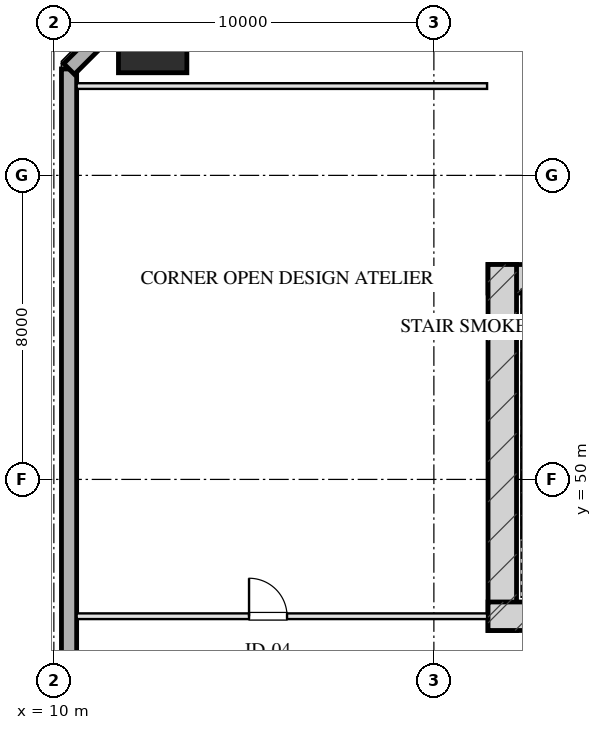
"""IFC4 building model, lengths in metres.
Left out: names, types, materials, properties, quantities, classifications, styles, units other than length and angle.
Written with IfcOpenShell. Run it as: python <this file> out.ifc"""

import sys

from ifc_helpers import new_model, si_unit, direction, frame, frame_2d, origin, origin_2d, place, context, subcontext, project, spatial, rectangle, hollow_rectangle, extrude, element, fill, save


model = new_model("IFC4")
c1 = context("Model", 3, precision=1e-05, world=origin(), true_north=direction((0.0, 1.0)))
c2 = subcontext(c1, "Body", "Model", "MODEL_VIEW")
j1 = project(units=[si_unit("LENGTHUNIT", "METRE"), si_unit("PLANEANGLEUNIT", "RADIAN")], contexts=[c1])
p1 = place(None, origin())
s1 = spatial("IfcSite", under=j1, at=p1, CompositionType="ELEMENT")
p2 = place(p1, origin())
s2 = spatial("IfcBuilding", under=s1, at=p2, CompositionType="ELEMENT")
p3 = place(p2, frame((0.0, 0.0, 78.2)))
s3 = spatial("IfcBuildingStorey", under=s2, at=p3, CompositionType="ELEMENT", Elevation=78.2)
p4 = place(p3, frame((21.425, 55.28, 0.0), z_axis=(0.0, 0.0, 1.0), x_axis=(1.0, 0.0, 0.0)))
e1 = element("IfcWall", 1, at=p4, inside=s3, PredefinedType="SHEAR", context=c2, shape_type="SweptSolid", body=[
    extrude(rectangle(XDim=17.15, YDim=0.75, at=frame_2d((8.575, 0.0))), origin(), (0.0, 0.0, 1.0), 3.45),
])
p5 = place(p3, frame((21.8, 46.025, 0.0), z_axis=(0.0, 0.0, 1.0), x_axis=(0.0, 1.0, 0.0)))
e2 = element("IfcWall", 2, at=p5, inside=s3, PredefinedType="SHEAR", context=c2, shape_type="SweptSolid", body=[
    extrude(rectangle(XDim=9.63, YDim=0.75, at=frame_2d((4.815, 0.0))), origin(), (0.0, 0.0, 1.0), 3.45),
])
p6 = place(p3, frame((21.425, 46.4, 0.0), z_axis=(0.0, 0.0, 1.0), x_axis=(1.0, 0.0, 0.0)))
e3 = element("IfcWall", 3, at=p6, inside=s3, PredefinedType="SHEAR", context=c2, shape_type="SweptSolid", body=[
    extrude(rectangle(XDim=4.295, YDim=0.75, at=frame_2d((2.147, 0.0))), origin(), (0.0, 0.0, 1.0), 3.45),
])
p7 = place(p3, frame((12.6, 61.6, 0.0), z_axis=(0.0, 0.0, 1.0), x_axis=(1.0, 0.0, 0.0)))
e4 = element("IfcColumn", 4, at=p7, inside=s3, PredefinedType="COLUMN", context=c2, shape_type="SweptSolid", body=[
    extrude(hollow_rectangle(XDim=1.8, YDim=1.8, WallThickness=0.06, at=origin_2d()), origin(), (0.0, 0.0, 1.0), 3.451),
])
p8 = place(p3, frame((10.4, 7.2, 0.0), z_axis=(0.0, 0.0, 1.0), x_axis=(0.0, 1.0, 0.0)))
e5 = element("IfcWall", 5, at=p8, inside=s3, PredefinedType="SOLIDWALL", context=c2, shape_type="SweptSolid", body=[
    extrude(rectangle(XDim=53.6, YDim=0.4, at=frame_2d((26.8, 0.0))), origin(), (0.0, 0.0, 1.0), 2.61),
])
p9 = place(p8, frame((19.2, 0.0, 0.75)))
e6 = element("IfcOpeningElement", 6, at=p9, cuts=e5, PredefinedType="OPENING", context=c2, shape_type="SweptSolid", body=[
    extrude(rectangle(XDim=2.4, YDim=1.46, at=frame_2d((1.2, 0.73))), frame((0.0, 0.21, 0.0), z_axis=(0.0, -1.0, 0.0), x_axis=(1.0, 0.0, 0.0)), (0.0, 0.0, 1.0), 0.42),
])
p10 = place(p8, frame((30.65, 0.0, 0.0)))
e7 = element("IfcOpeningElement", 7, at=p10, cuts=e5, PredefinedType="OPENING", context=c2, shape_type="SweptSolid", body=[
    extrude(rectangle(XDim=1.1, YDim=2.15, at=frame_2d((0.55, 1.075))), frame((0.0, 0.21, 0.0), z_axis=(0.0, -1.0, 0.0), x_axis=(1.0, 0.0, 0.0)), (0.0, 0.0, 1.0), 0.42),
])
p11 = place(p3, frame((10.4, 60.8, 0.0), z_axis=(0.0, 0.0, 1.0), x_axis=(0.707106781187, 0.707106781187, 0.0)))
e8 = element("IfcWall", 8, at=p11, inside=s3, PredefinedType="SOLIDWALL", context=c2, shape_type="SweptSolid", body=[
    extrude(rectangle(XDim=4.243, YDim=0.4, at=frame_2d((2.121, 0.0))), origin(), (0.0, 0.0, 1.0), 2.61),
])
p12 = place(p3, frame((10.6, 60.35, 0.0), z_axis=(0.0, 0.0, 1.0), x_axis=(1.0, 0.0, 0.0)))
e9 = element("IfcWall", 9, at=p12, inside=s3, PredefinedType="PARTITIONING", context=c2, shape_type="SweptSolid", body=[
    extrude(rectangle(XDim=10.8, YDim=0.15, at=frame_2d((5.4, 0.0))), origin(), (0.0, 0.0, 1.0), 3.175),
])
p13 = place(p3, frame((10.6, 46.4, 0.0), z_axis=(0.0, 0.0, 1.0), x_axis=(1.0, 0.0, 0.0)))
e10 = element("IfcWall", 10, at=p13, inside=s3, PredefinedType="PARTITIONING", context=c2, shape_type="SweptSolid", body=[
    extrude(rectangle(XDim=10.8, YDim=0.15, at=frame_2d((5.4, 0.0))), origin(), (0.0, 0.0, 1.0), 3.175),
])
p14 = place(p13, frame((4.536, 0.0, 0.0)))
e11 = element("IfcOpeningElement", 11, at=p14, cuts=e10, PredefinedType="OPENING", context=c2, shape_type="SweptSolid", body=[
    extrude(rectangle(XDim=1.0, YDim=2.05, at=frame_2d((0.5, 1.025))), frame((0.0, 0.085, 0.0), z_axis=(0.0, -1.0, 0.0), x_axis=(1.0, 0.0, 0.0)), (0.0, 0.0, 1.0), 0.17),
])
p15 = place(p14, origin())
e12 = element("IfcDoor", 12, at=p15, inside=s3, OperationType="SINGLE_SWING_LEFT", PredefinedType="DOOR", context=c2, shape_type="SweptSolid", body=[
    extrude(rectangle(XDim=1.0, YDim=2.05, at=frame_2d((0.5, 1.025))), frame((0.0, 0.025, 0.0), z_axis=(0.0, -1.0, 0.0), x_axis=(1.0, 0.0, 0.0)), (0.0, 0.0, 1.0), 0.05),
])
fill(e11, e12)
save(model, sys.argv[1])
